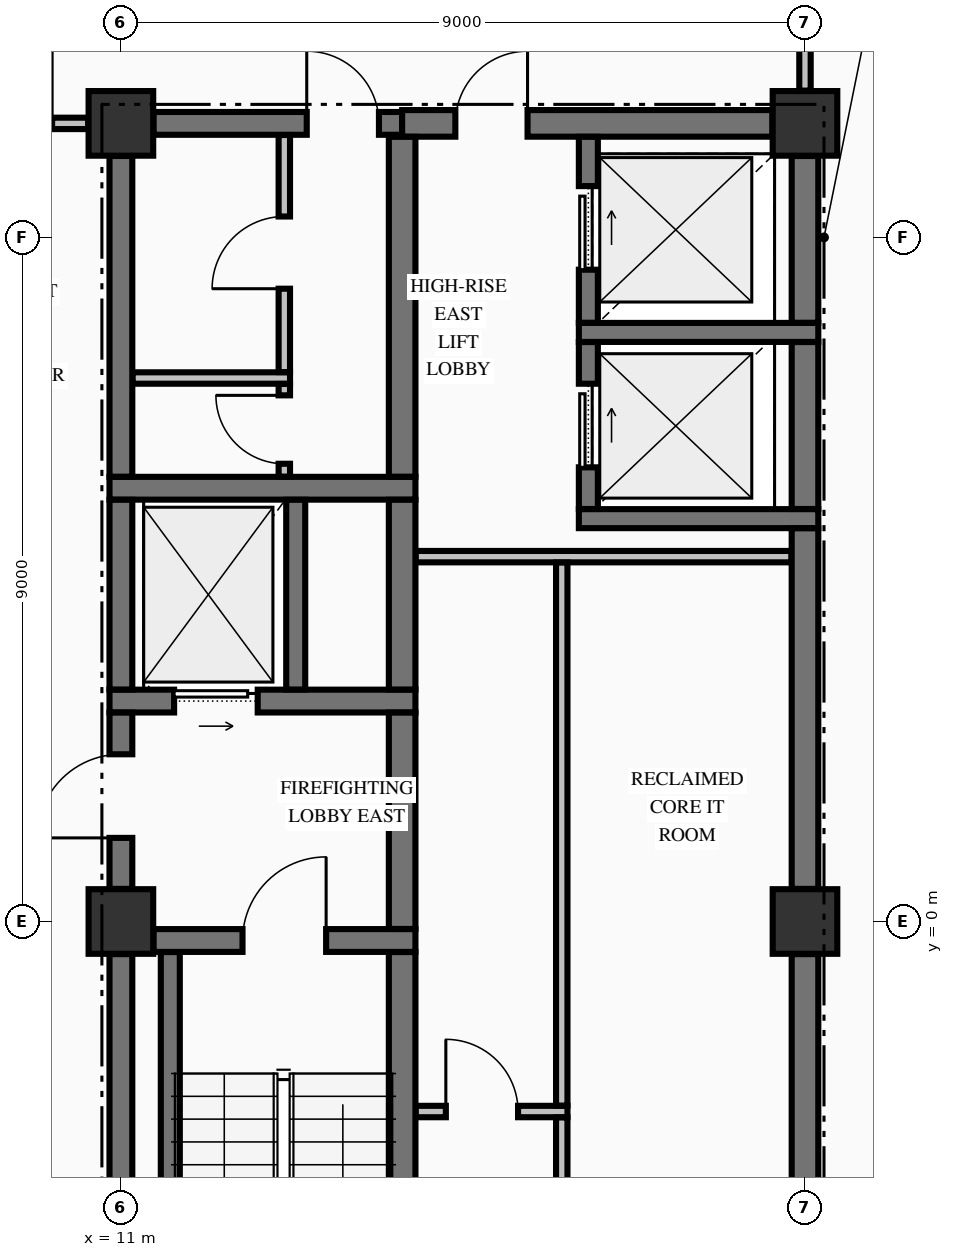
"""IFC4 building model, lengths in metres.
Left out: names, types, materials, properties, quantities, classifications, styles, units other than length and angle.
Written with IfcOpenShell. Run it as: python <this file> out.ifc"""

import sys

from ifc_helpers import new_model, si_unit, direction, frame, frame_2d, origin, origin_2d, place, context, subcontext, project, spatial, rectangle, extrude, element, fill, save


model = new_model("IFC4")
c1 = context("Model", 3, precision=1e-05, world=origin(), true_north=direction((0.0, 1.0)))
c2 = subcontext(c1, "Body", "Model", "MODEL_VIEW")
j1 = project(units=[si_unit("LENGTHUNIT", "METRE"), si_unit("PLANEANGLEUNIT", "RADIAN")], contexts=[c1])
p1 = place(None, origin())
s1 = spatial("IfcSite", under=j1, at=p1, CompositionType="ELEMENT")
p2 = place(p1, origin())
s2 = spatial("IfcBuilding", under=s1, at=p2, CompositionType="ELEMENT")
p3 = place(p2, frame((0.0, 0.0, 218.66)))
s3 = spatial("IfcBuildingStorey", under=s2, at=p3, CompositionType="ELEMENT", Elevation=218.66)
for number, where, z_axis, x_axis in (
    (1, (11.0, 0.0, -0.25), (0.0, 0.0, 1.0), (1.0, 0.0, 0.0)),
    (2, (11.0, 10.5, -0.25), (0.0, 0.0, 1.0), (1.0, 0.0, 0.0)),
    (3, (20.0, 10.5, -0.25), (0.0, 0.0, 1.0), (1.0, 0.0, 0.0)),
    (4, (20.0, 0.0, -0.25), (0.0, 0.0, 1.0), (1.0, 0.0, 0.0)),
):
    element("IfcColumn", number, at=place(p3, frame(where, z_axis=z_axis, x_axis=x_axis)), inside=s3, PredefinedType="COLUMN", context=c2, shape_type="SweptSolid", body=[
        extrude(rectangle(XDim=0.85, YDim=0.85, at=origin_2d()), origin(), (0.0, 0.0, 1.0), 3.225),
    ])
p4 = place(p3, frame((11.429, -0.25, 0.0), z_axis=(0.0, 0.0, 1.0), x_axis=(1.0, 0.0, 0.0)))
e5 = element("IfcWall", 5, at=p4, inside=s3, PredefinedType="SHEAR", context=c2, shape_type="SweptSolid", body=[
    extrude(rectangle(XDim=3.446, YDim=0.3, at=frame_2d((1.723, 0.0))), origin(), (0.0, 0.0, 1.0), 2.975),
])
p5 = place(p4, frame((1.171, 0.0, 0.0)))
e6 = element("IfcOpeningElement", 6, at=p5, cuts=e5, PredefinedType="OPENING", context=c2, shape_type="SweptSolid", body=[
    extrude(rectangle(XDim=1.1, YDim=2.15, at=frame_2d((0.55, 1.075))), frame((0.0, 0.16, 0.0), z_axis=(0.0, -1.0, 0.0), x_axis=(1.0, 0.0, 0.0)), (0.0, 0.0, 1.0), 0.32),
])
p6 = place(p3, frame((10.85, 2.9, 0.0), z_axis=(0.0, 0.0, 1.0), x_axis=(1.0, 0.0, 0.0)))
e7 = element("IfcWall", 7, at=p6, inside=s3, PredefinedType="SHEAR", context=c2, shape_type="SweptSolid", body=[
    extrude(rectangle(XDim=4.025, YDim=0.3, at=frame_2d((2.012, 0.0))), origin(), (0.0, 0.0, 1.0), 2.975),
])
p7 = place(p6, frame((0.85, 0.0, 0.0)))
e8 = element("IfcOpeningElement", 8, at=p7, cuts=e7, PredefinedType="OPENING", context=c2, shape_type="SweptSolid", body=[
    extrude(rectangle(XDim=1.1, YDim=2.2, at=frame_2d((0.55, 1.1))), frame((0.0, 0.16, 0.0), z_axis=(0.0, -1.0, 0.0), x_axis=(1.0, 0.0, 0.0)), (0.0, 0.0, 1.0), 0.32),
])
p8 = place(p3, frame((17.025, 5.3, 0.0), z_axis=(0.0, 0.0, 1.0), x_axis=(1.0, 0.0, 0.0)))
e9 = element("IfcWall", 9, at=p8, inside=s3, PredefinedType="SOLIDWALL", context=c2, shape_type="SweptSolid", body=[
    extrude(rectangle(XDim=3.15, YDim=0.25, at=frame_2d((1.575, 0.0))), origin(), (0.0, 0.0, 1.0), 2.975),
])
p9 = place(p3, frame((10.85, 5.7, 0.0), z_axis=(0.0, 0.0, 1.0), x_axis=(1.0, 0.0, 0.0)))
e10 = element("IfcWall", 10, at=p9, inside=s3, PredefinedType="SHEAR", context=c2, shape_type="SweptSolid", body=[
    extrude(rectangle(XDim=4.025, YDim=0.3, at=frame_2d((2.012, 0.0))), origin(), (0.0, 0.0, 1.0), 2.975),
])
p10 = place(p3, frame((17.025, 7.75, 0.0), z_axis=(0.0, 0.0, 1.0), x_axis=(1.0, 0.0, 0.0)))
e11 = element("IfcWall", 11, at=p10, inside=s3, PredefinedType="SOLIDWALL", context=c2, shape_type="SweptSolid", body=[
    extrude(rectangle(XDim=3.15, YDim=0.25, at=frame_2d((1.575, 0.0))), origin(), (0.0, 0.0, 1.0), 2.975),
])
p11 = place(p3, frame((11.429, 10.5, 0.0), z_axis=(0.0, 0.0, 1.0), x_axis=(1.0, 0.0, 0.0)))
e12 = element("IfcWall", 12, at=p11, inside=s3, PredefinedType="SHEAR", context=c2, shape_type="SweptSolid", body=[
    extrude(rectangle(XDim=3.271, YDim=0.3, at=frame_2d((1.635, 0.0))), origin(), (0.0, 0.0, 1.0), 2.975),
])
p12 = place(p11, frame((2.016, 0.0, 0.0)))
e13 = element("IfcOpeningElement", 13, at=p12, cuts=e12, PredefinedType="OPENING", context=c2, shape_type="SweptSolid", body=[
    extrude(rectangle(XDim=0.95, YDim=2.02, at=frame_2d((0.475, 1.01))), frame((0.0, 0.16, 0.0), z_axis=(0.0, -1.0, 0.0), x_axis=(1.0, 0.0, 0.0)), (0.0, 0.0, 1.0), 0.32),
])
p13 = place(p3, frame((14.7, 10.5, 0.0), z_axis=(0.0, 0.0, 1.0), x_axis=(1.0, 0.0, 0.0)))
e14 = element("IfcWall", 14, at=p13, inside=s3, PredefinedType="SHEAR", context=c2, shape_type="SweptSolid", body=[
    extrude(rectangle(XDim=4.871, YDim=0.35, at=frame_2d((2.436, 0.0))), origin(), (0.0, 0.0, 1.0), 2.975),
])
p14 = place(p13, frame((0.7, 0.0, 0.0)))
e15 = element("IfcOpeningElement", 15, at=p14, cuts=e14, PredefinedType="OPENING", context=c2, shape_type="SweptSolid", body=[
    extrude(rectangle(XDim=0.95, YDim=2.02, at=frame_2d((0.475, 1.01))), frame((0.0, 0.185, 0.0), z_axis=(0.0, -1.0, 0.0), x_axis=(1.0, 0.0, 0.0)), (0.0, 0.0, 1.0), 0.37),
])
p15 = place(p3, frame((14.878, -2.5, 0.0), z_axis=(0.0, 0.0, 1.0), x_axis=(1.0, 0.0, 0.0)))
e16 = element("IfcWall", 16, at=p15, inside=s3, PredefinedType="PARTITIONING", context=c2, shape_type="SweptSolid", body=[
    extrude(rectangle(XDim=1.997, YDim=0.15, at=frame_2d((0.999, 0.0))), origin(), (0.0, 0.0, 1.0), 2.975),
])
p16 = place(p15, frame((0.397, 0.0, 0.0)))
e17 = element("IfcOpeningElement", 17, at=p16, cuts=e16, PredefinedType="OPENING", context=c2, shape_type="SweptSolid", body=[
    extrude(rectangle(XDim=0.95, YDim=2.15, at=frame_2d((0.475, 1.075))), frame((0.0, 0.085, 0.0), z_axis=(0.0, -1.0, 0.0), x_axis=(1.0, 0.0, 0.0)), (0.0, 0.0, 1.0), 0.17),
])
p17 = place(p3, frame((14.878, 4.8, 0.0), z_axis=(0.0, 0.0, 1.0), x_axis=(1.0, 0.0, 0.0)))
e18 = element("IfcWall", 18, at=p17, inside=s3, PredefinedType="PARTITIONING", context=c2, shape_type="SweptSolid", body=[
    extrude(rectangle(XDim=4.944, YDim=0.15, at=frame_2d((2.472, 0.0))), origin(), (0.0, 0.0, 1.0), 2.975),
])
p18 = place(p3, frame((11.153, 7.15, 0.0), z_axis=(0.0, 0.0, 1.0), x_axis=(1.0, 0.0, 0.0)))
e19 = element("IfcWall", 19, at=p18, inside=s3, PredefinedType="PARTITIONING", context=c2, shape_type="SweptSolid", body=[
    extrude(rectangle(XDim=2.072, YDim=0.15, at=frame_2d((1.036, 0.0))), origin(), (0.0, 0.0, 1.0), 2.975),
])
p19 = place(p3, frame((-10.569, 10.5, 0.0), z_axis=(0.0, 0.0, 1.0), x_axis=(1.0, 0.0, 0.0)))
e20 = element("IfcWall", 20, at=p19, inside=s3, PredefinedType="PARTITIONING", context=c2, shape_type="SweptSolid", body=[
    extrude(rectangle(XDim=21.138, YDim=0.15, at=frame_2d((10.569, 0.0))), origin(), (0.0, 0.0, 1.0), 2.975),
])
p20 = place(p19, frame((0.474, 0.0, 0.0)))
e21 = element("IfcOpeningElement", 21, at=p20, cuts=e20, PredefinedType="OPENING", context=c2, shape_type="SweptSolid", body=[
    extrude(rectangle(XDim=1.05, YDim=2.15, at=frame_2d((0.525, 1.075))), frame((0.0, 0.085, 0.0), z_axis=(0.0, -1.0, 0.0), x_axis=(1.0, 0.0, 0.0)), (0.0, 0.0, 1.0), 0.17),
])
p21 = place(p19, frame((19.614, 0.0, 0.0)))
e22 = element("IfcOpeningElement", 22, at=p21, cuts=e20, PredefinedType="OPENING", context=c2, shape_type="SweptSolid", body=[
    extrude(rectangle(XDim=1.05, YDim=2.15, at=frame_2d((0.525, 1.075))), frame((0.0, 0.085, 0.0), z_axis=(0.0, -1.0, 0.0), x_axis=(1.0, 0.0, 0.0)), (0.0, 0.0, 1.0), 0.17),
])
p22 = place(p3, frame((11.0, -9.521, 0.0), z_axis=(0.0, 0.0, 1.0), x_axis=(0.0, 1.0, 0.0)))
e23 = element("IfcWall", 23, at=p22, inside=s3, PredefinedType="SHEAR", context=c2, shape_type="SweptSolid", body=[
    extrude(rectangle(XDim=9.092, YDim=0.3, at=frame_2d((4.546, 0.0))), origin(), (0.0, 0.0, 1.0), 2.975),
])
p23 = place(p3, frame((11.0, 0.429, 0.0), z_axis=(0.0, 0.0, 1.0), x_axis=(0.0, 1.0, 0.0)))
e24 = element("IfcWall", 24, at=p23, inside=s3, PredefinedType="SHEAR", context=c2, shape_type="SweptSolid", body=[
    extrude(rectangle(XDim=2.319, YDim=0.3, at=frame_2d((1.16, 0.0))), origin(), (0.0, 0.0, 1.0), 2.975),
])
p24 = place(p23, frame((0.671, 0.0, 0.0)))
e25 = element("IfcOpeningElement", 25, at=p24, cuts=e24, PredefinedType="OPENING", context=c2, shape_type="SweptSolid", body=[
    extrude(rectangle(XDim=1.1, YDim=2.15, at=frame_2d((0.55, 1.075))), frame((0.0, 0.16, 0.0), z_axis=(0.0, -1.0, 0.0), x_axis=(1.0, 0.0, 0.0)), (0.0, 0.0, 1.0), 0.32),
])
p25 = place(p3, frame((11.0, 3.052, 0.0), z_axis=(0.0, 0.0, 1.0), x_axis=(0.0, 1.0, 0.0)))
e26 = element("IfcWall", 26, at=p25, inside=s3, PredefinedType="SHEAR", context=c2, shape_type="SweptSolid", body=[
    extrude(rectangle(XDim=2.496, YDim=0.3, at=frame_2d((1.248, 0.0))), origin(), (0.0, 0.0, 1.0), 2.975),
])
p26 = place(p3, frame((11.0, 5.852, 0.0), z_axis=(0.0, 0.0, 1.0), x_axis=(0.0, 1.0, 0.0)))
e27 = element("IfcWall", 27, at=p26, inside=s3, PredefinedType="SHEAR", context=c2, shape_type="SweptSolid", body=[
    extrude(rectangle(XDim=4.219, YDim=0.3, at=frame_2d((2.109, 0.0))), origin(), (0.0, 0.0, 1.0), 2.975),
])
p27 = place(p3, frame((11.65, -9.798, 0.0), z_axis=(0.0, 0.0, 1.0), x_axis=(0.0, 1.0, 0.0)))
e28 = element("IfcWall", 28, at=p27, inside=s3, PredefinedType="SOLIDWALL", context=c2, shape_type="SweptSolid", body=[
    extrude(rectangle(XDim=9.396, YDim=0.25, at=frame_2d((4.698, 0.0))), origin(), (0.0, 0.0, 1.0), 2.975),
])
p28 = place(p3, frame((13.3, 3.052, 0.0), z_axis=(0.0, 0.0, 1.0), x_axis=(0.0, 1.0, 0.0)))
e29 = element("IfcWall", 29, at=p28, inside=s3, PredefinedType="SOLIDWALL", context=c2, shape_type="SweptSolid", body=[
    extrude(rectangle(XDim=2.496, YDim=0.25, at=frame_2d((1.248, 0.0))), origin(), (0.0, 0.0, 1.0), 2.975),
])
p29 = place(p3, frame((14.7, -9.773, 0.0), z_axis=(0.0, 0.0, 1.0), x_axis=(0.0, 1.0, 0.0)))
e30 = element("IfcWall", 30, at=p29, inside=s3, PredefinedType="SHEAR", context=c2, shape_type="SweptSolid", body=[
    extrude(rectangle(XDim=9.371, YDim=0.35, at=frame_2d((4.686, 0.0))), origin(), (0.0, 0.0, 1.0), 2.975),
])
p30 = place(p3, frame((14.7, -0.098, 0.0), z_axis=(0.0, 0.0, 1.0), x_axis=(0.0, 1.0, 0.0)))
e31 = element("IfcWall", 31, at=p30, inside=s3, PredefinedType="SHEAR", context=c2, shape_type="SweptSolid", body=[
    extrude(rectangle(XDim=2.846, YDim=0.35, at=frame_2d((1.423, 0.0))), origin(), (0.0, 0.0, 1.0), 2.975),
])
p31 = place(p3, frame((14.7, 3.052, 0.0), z_axis=(0.0, 0.0, 1.0), x_axis=(0.0, 1.0, 0.0)))
e32 = element("IfcWall", 32, at=p31, inside=s3, PredefinedType="SHEAR", context=c2, shape_type="SweptSolid", body=[
    extrude(rectangle(XDim=2.496, YDim=0.35, at=frame_2d((1.248, 0.0))), origin(), (0.0, 0.0, 1.0), 2.975),
])
p32 = place(p3, frame((14.7, 5.852, 0.0), z_axis=(0.0, 0.0, 1.0), x_axis=(0.0, 1.0, 0.0)))
e33 = element("IfcWall", 33, at=p32, inside=s3, PredefinedType="SHEAR", context=c2, shape_type="SweptSolid", body=[
    extrude(rectangle(XDim=4.471, YDim=0.35, at=frame_2d((2.235, 0.0))), origin(), (0.0, 0.0, 1.0), 2.975),
])
p33 = place(p3, frame((17.15, 5.427, 0.0), z_axis=(0.0, 0.0, 1.0), x_axis=(0.0, 1.0, 0.0)))
e34 = element("IfcWall", 34, at=p33, inside=s3, PredefinedType="SOLIDWALL", context=c2, shape_type="SweptSolid", body=[
    extrude(rectangle(XDim=2.196, YDim=0.25, at=frame_2d((1.098, 0.0))), origin(), (0.0, 0.0, 1.0), 2.975),
])
p34 = place(p33, frame((0.548, 0.0, 0.0)))
e35 = element("IfcOpeningElement", 35, at=p34, cuts=e34, PredefinedType="OPENING", context=c2, shape_type="SweptSolid", body=[
    extrude(rectangle(XDim=1.1, YDim=2.2, at=frame_2d((0.55, 1.1))), frame((0.0, 0.135, 0.0), z_axis=(0.0, -1.0, 0.0), x_axis=(1.0, 0.0, 0.0)), (0.0, 0.0, 1.0), 0.27),
])
p35 = place(p3, frame((17.15, 7.877, 0.0), z_axis=(0.0, 0.0, 1.0), x_axis=(0.0, 1.0, 0.0)))
e36 = element("IfcWall", 36, at=p35, inside=s3, PredefinedType="SOLIDWALL", context=c2, shape_type="SweptSolid", body=[
    extrude(rectangle(XDim=2.446, YDim=0.25, at=frame_2d((1.223, 0.0))), origin(), (0.0, 0.0, 1.0), 2.975),
])
p36 = place(p35, frame((0.698, 0.0, 0.0)))
e37 = element("IfcOpeningElement", 37, at=p36, cuts=e36, PredefinedType="OPENING", context=c2, shape_type="SweptSolid", body=[
    extrude(rectangle(XDim=1.1, YDim=2.2, at=frame_2d((0.55, 1.1))), frame((0.0, 0.135, 0.0), z_axis=(0.0, -1.0, 0.0), x_axis=(1.0, 0.0, 0.0)), (0.0, 0.0, 1.0), 0.27),
])
p37 = place(p3, frame((20.0, -9.521, 0.0), z_axis=(0.0, 0.0, 1.0), x_axis=(0.0, 1.0, 0.0)))
e38 = element("IfcWall", 38, at=p37, inside=s3, PredefinedType="SHEAR", context=c2, shape_type="SweptSolid", body=[
    extrude(rectangle(XDim=9.092, YDim=0.35, at=frame_2d((4.546, 0.0))), origin(), (0.0, 0.0, 1.0), 2.975),
])
p38 = place(p3, frame((20.0, 0.429, 0.0), z_axis=(0.0, 0.0, 1.0), x_axis=(0.0, 1.0, 0.0)))
e39 = element("IfcWall", 39, at=p38, inside=s3, PredefinedType="SHEAR", context=c2, shape_type="SweptSolid", body=[
    extrude(rectangle(XDim=4.744, YDim=0.35, at=frame_2d((2.372, 0.0))), origin(), (0.0, 0.0, 1.0), 2.975),
])
p39 = place(p3, frame((20.0, 5.427, 0.0), z_axis=(0.0, 0.0, 1.0), x_axis=(0.0, 1.0, 0.0)))
e40 = element("IfcWall", 40, at=p39, inside=s3, PredefinedType="SHEAR", context=c2, shape_type="SweptSolid", body=[
    extrude(rectangle(XDim=2.196, YDim=0.35, at=frame_2d((1.098, 0.0))), origin(), (0.0, 0.0, 1.0), 2.975),
])
p40 = place(p3, frame((20.0, 7.877, 0.0), z_axis=(0.0, 0.0, 1.0), x_axis=(0.0, 1.0, 0.0)))
e41 = element("IfcWall", 41, at=p40, inside=s3, PredefinedType="SHEAR", context=c2, shape_type="SweptSolid", body=[
    extrude(rectangle(XDim=2.194, YDim=0.35, at=frame_2d((1.097, 0.0))), origin(), (0.0, 0.0, 1.0), 2.975),
])
p41 = place(p3, frame((13.15, 5.853, 0.0), z_axis=(0.0, 0.0, 1.0), x_axis=(0.0, 1.0, 0.0)))
e42 = element("IfcWall", 42, at=p41, inside=s3, PredefinedType="PARTITIONING", context=c2, shape_type="SweptSolid", body=[
    extrude(rectangle(XDim=1.219, YDim=0.15, at=frame_2d((0.609, 0.0))), origin(), (0.0, 0.0, 1.0), 2.975),
])
p42 = place(p41, frame((0.169, 0.0, 0.0)))
e43 = element("IfcOpeningElement", 43, at=p42, cuts=e42, PredefinedType="OPENING", context=c2, shape_type="SweptSolid", body=[
    extrude(rectangle(XDim=0.9, YDim=2.15, at=frame_2d((0.45, 1.075))), frame((0.0, 0.085, 0.0), z_axis=(0.0, -1.0, 0.0), x_axis=(1.0, 0.0, 0.0)), (0.0, 0.0, 1.0), 0.17),
])
p43 = place(p3, frame((13.15, 7.228, 0.0), z_axis=(0.0, 0.0, 1.0), x_axis=(0.0, 1.0, 0.0)))
e44 = element("IfcWall", 44, at=p43, inside=s3, PredefinedType="PARTITIONING", context=c2, shape_type="SweptSolid", body=[
    extrude(rectangle(XDim=3.119, YDim=0.15, at=frame_2d((1.56, 0.0))), origin(), (0.0, 0.0, 1.0), 2.975),
])
p44 = place(p43, frame((1.097, 0.0, 0.0)))
e45 = element("IfcOpeningElement", 45, at=p44, cuts=e44, PredefinedType="OPENING", context=c2, shape_type="SweptSolid", body=[
    extrude(rectangle(XDim=0.95, YDim=2.15, at=frame_2d((0.475, 1.075))), frame((0.0, 0.085, 0.0), z_axis=(0.0, -1.0, 0.0), x_axis=(1.0, 0.0, 0.0)), (0.0, 0.0, 1.0), 0.17),
])
p45 = place(p3, frame((16.8, -9.772, 0.0), z_axis=(0.0, 0.0, 1.0), x_axis=(0.0, 1.0, 0.0)))
e46 = element("IfcWall", 46, at=p45, inside=s3, PredefinedType="PARTITIONING", context=c2, shape_type="SweptSolid", body=[
    extrude(rectangle(XDim=7.194, YDim=0.15, at=frame_2d((3.597, 0.0))), origin(), (0.0, 0.0, 1.0), 2.975),
])
p46 = place(p3, frame((16.8, -2.422, 0.0), z_axis=(0.0, 0.0, 1.0), x_axis=(0.0, 1.0, 0.0)))
e47 = element("IfcWall", 47, at=p46, inside=s3, PredefinedType="PARTITIONING", context=c2, shape_type="SweptSolid", body=[
    extrude(rectangle(XDim=7.144, YDim=0.15, at=frame_2d((3.572, 0.0))), origin(), (0.0, 0.0, 1.0), 2.975),
])
p47 = place(p3, frame((20.0, 10.931, 0.0), z_axis=(0.0, 0.0, 1.0), x_axis=(0.0, 1.0, 0.0)))
e48 = element("IfcWall", 48, at=p47, inside=s3, PredefinedType="PARTITIONING", context=c2, shape_type="SweptSolid", body=[
    extrude(rectangle(XDim=2.141, YDim=0.15, at=frame_2d((1.071, 0.0))), origin(), (0.0, 0.0, 1.0), 2.167),
])
p48 = place(p5, origin())
e49 = element("IfcDoor", 49, at=p48, inside=s3, OperationType="SINGLE_SWING_RIGHT", PredefinedType="DOOR", context=c2, shape_type="SweptSolid", body=[
    extrude(rectangle(XDim=1.1, YDim=2.15, at=frame_2d((0.55, 1.075))), frame((0.0, 0.025, 0.0), z_axis=(0.0, -1.0, 0.0), x_axis=(1.0, 0.0, 0.0)), (0.0, 0.0, 1.0), 0.05),
])
fill(e6, e49)
p49 = place(p24, origin())
e50 = element("IfcDoor", 50, at=p49, inside=s3, OperationType="SINGLE_SWING_LEFT", PredefinedType="DOOR", context=c2, shape_type="SweptSolid", body=[
    extrude(rectangle(XDim=1.1, YDim=2.15, at=frame_2d((0.55, 1.075))), frame((0.0, 0.025, 0.0), z_axis=(0.0, -1.0, 0.0), x_axis=(1.0, 0.0, 0.0)), (0.0, 0.0, 1.0), 0.05),
])
fill(e25, e50)
p50 = place(p7, origin())
e51 = element("IfcDoor", 51, at=p50, inside=s3, OperationType="SLIDING_TO_RIGHT", PredefinedType="DOOR", context=c2, shape_type="SweptSolid", body=[
    extrude(rectangle(XDim=1.1, YDim=2.2, at=frame_2d((0.55, 1.1))), frame((0.0, 0.025, 0.0), z_axis=(0.0, -1.0, 0.0), x_axis=(1.0, 0.0, 0.0)), (0.0, 0.0, 1.0), 0.05),
])
fill(e8, e51)
p51 = place(p12, origin())
e52 = element("IfcDoor", 52, at=p51, inside=s3, OperationType="SINGLE_SWING_LEFT", PredefinedType="DOOR", context=c2, shape_type="SweptSolid", body=[
    extrude(rectangle(XDim=0.95, YDim=2.02, at=frame_2d((0.475, 1.01))), frame((0.0, 0.025, 0.0), z_axis=(0.0, -1.0, 0.0), x_axis=(1.0, 0.0, 0.0)), (0.0, 0.0, 1.0), 0.05),
])
fill(e13, e52)
p52 = place(p42, origin())
e53 = element("IfcDoor", 53, at=p52, inside=s3, OperationType="SINGLE_SWING_RIGHT", PredefinedType="DOOR", context=c2, shape_type="SweptSolid", body=[
    extrude(rectangle(XDim=0.9, YDim=2.15, at=frame_2d((0.45, 1.075))), frame((0.0, 0.025, 0.0), z_axis=(0.0, -1.0, 0.0), x_axis=(1.0, 0.0, 0.0)), (0.0, 0.0, 1.0), 0.05),
])
fill(e43, e53)
p53 = place(p44, origin())
e54 = element("IfcDoor", 54, at=p53, inside=s3, OperationType="SINGLE_SWING_LEFT", PredefinedType="DOOR", context=c2, shape_type="SweptSolid", body=[
    extrude(rectangle(XDim=0.95, YDim=2.15, at=frame_2d((0.475, 1.075))), frame((0.0, 0.025, 0.0), z_axis=(0.0, -1.0, 0.0), x_axis=(1.0, 0.0, 0.0)), (0.0, 0.0, 1.0), 0.05),
])
fill(e45, e54)
p54 = place(p34, origin())
e55 = element("IfcDoor", 55, at=p54, inside=s3, OperationType="SLIDING_TO_RIGHT", PredefinedType="DOOR", context=c2, shape_type="SweptSolid", body=[
    extrude(rectangle(XDim=1.1, YDim=2.2, at=frame_2d((0.55, 1.1))), frame((0.0, 0.025, 0.0), z_axis=(0.0, -1.0, 0.0), x_axis=(1.0, 0.0, 0.0)), (0.0, 0.0, 1.0), 0.05),
])
fill(e35, e55)
p55 = place(p36, origin())
e56 = element("IfcDoor", 56, at=p55, inside=s3, OperationType="SLIDING_TO_RIGHT", PredefinedType="DOOR", context=c2, shape_type="SweptSolid", body=[
    extrude(rectangle(XDim=1.1, YDim=2.2, at=frame_2d((0.55, 1.1))), frame((0.0, 0.025, 0.0), z_axis=(0.0, -1.0, 0.0), x_axis=(1.0, 0.0, 0.0)), (0.0, 0.0, 1.0), 0.05),
])
fill(e37, e56)
p56 = place(p14, origin())
e57 = element("IfcDoor", 57, at=p56, inside=s3, OperationType="SINGLE_SWING_RIGHT", PredefinedType="DOOR", context=c2, shape_type="SweptSolid", body=[
    extrude(rectangle(XDim=0.95, YDim=2.02, at=frame_2d((0.475, 1.01))), frame((0.0, 0.025, 0.0), z_axis=(0.0, -1.0, 0.0), x_axis=(1.0, 0.0, 0.0)), (0.0, 0.0, 1.0), 0.05),
])
fill(e15, e57)
p57 = place(p16, origin())
e58 = element("IfcDoor", 58, at=p57, inside=s3, OperationType="SINGLE_SWING_LEFT", PredefinedType="DOOR", context=c2, shape_type="SweptSolid", body=[
    extrude(rectangle(XDim=0.95, YDim=2.15, at=frame_2d((0.475, 1.075))), frame((0.0, 0.025, 0.0), z_axis=(0.0, -1.0, 0.0), x_axis=(1.0, 0.0, 0.0)), (0.0, 0.0, 1.0), 0.05),
])
fill(e17, e58)
save(model, sys.argv[1])
